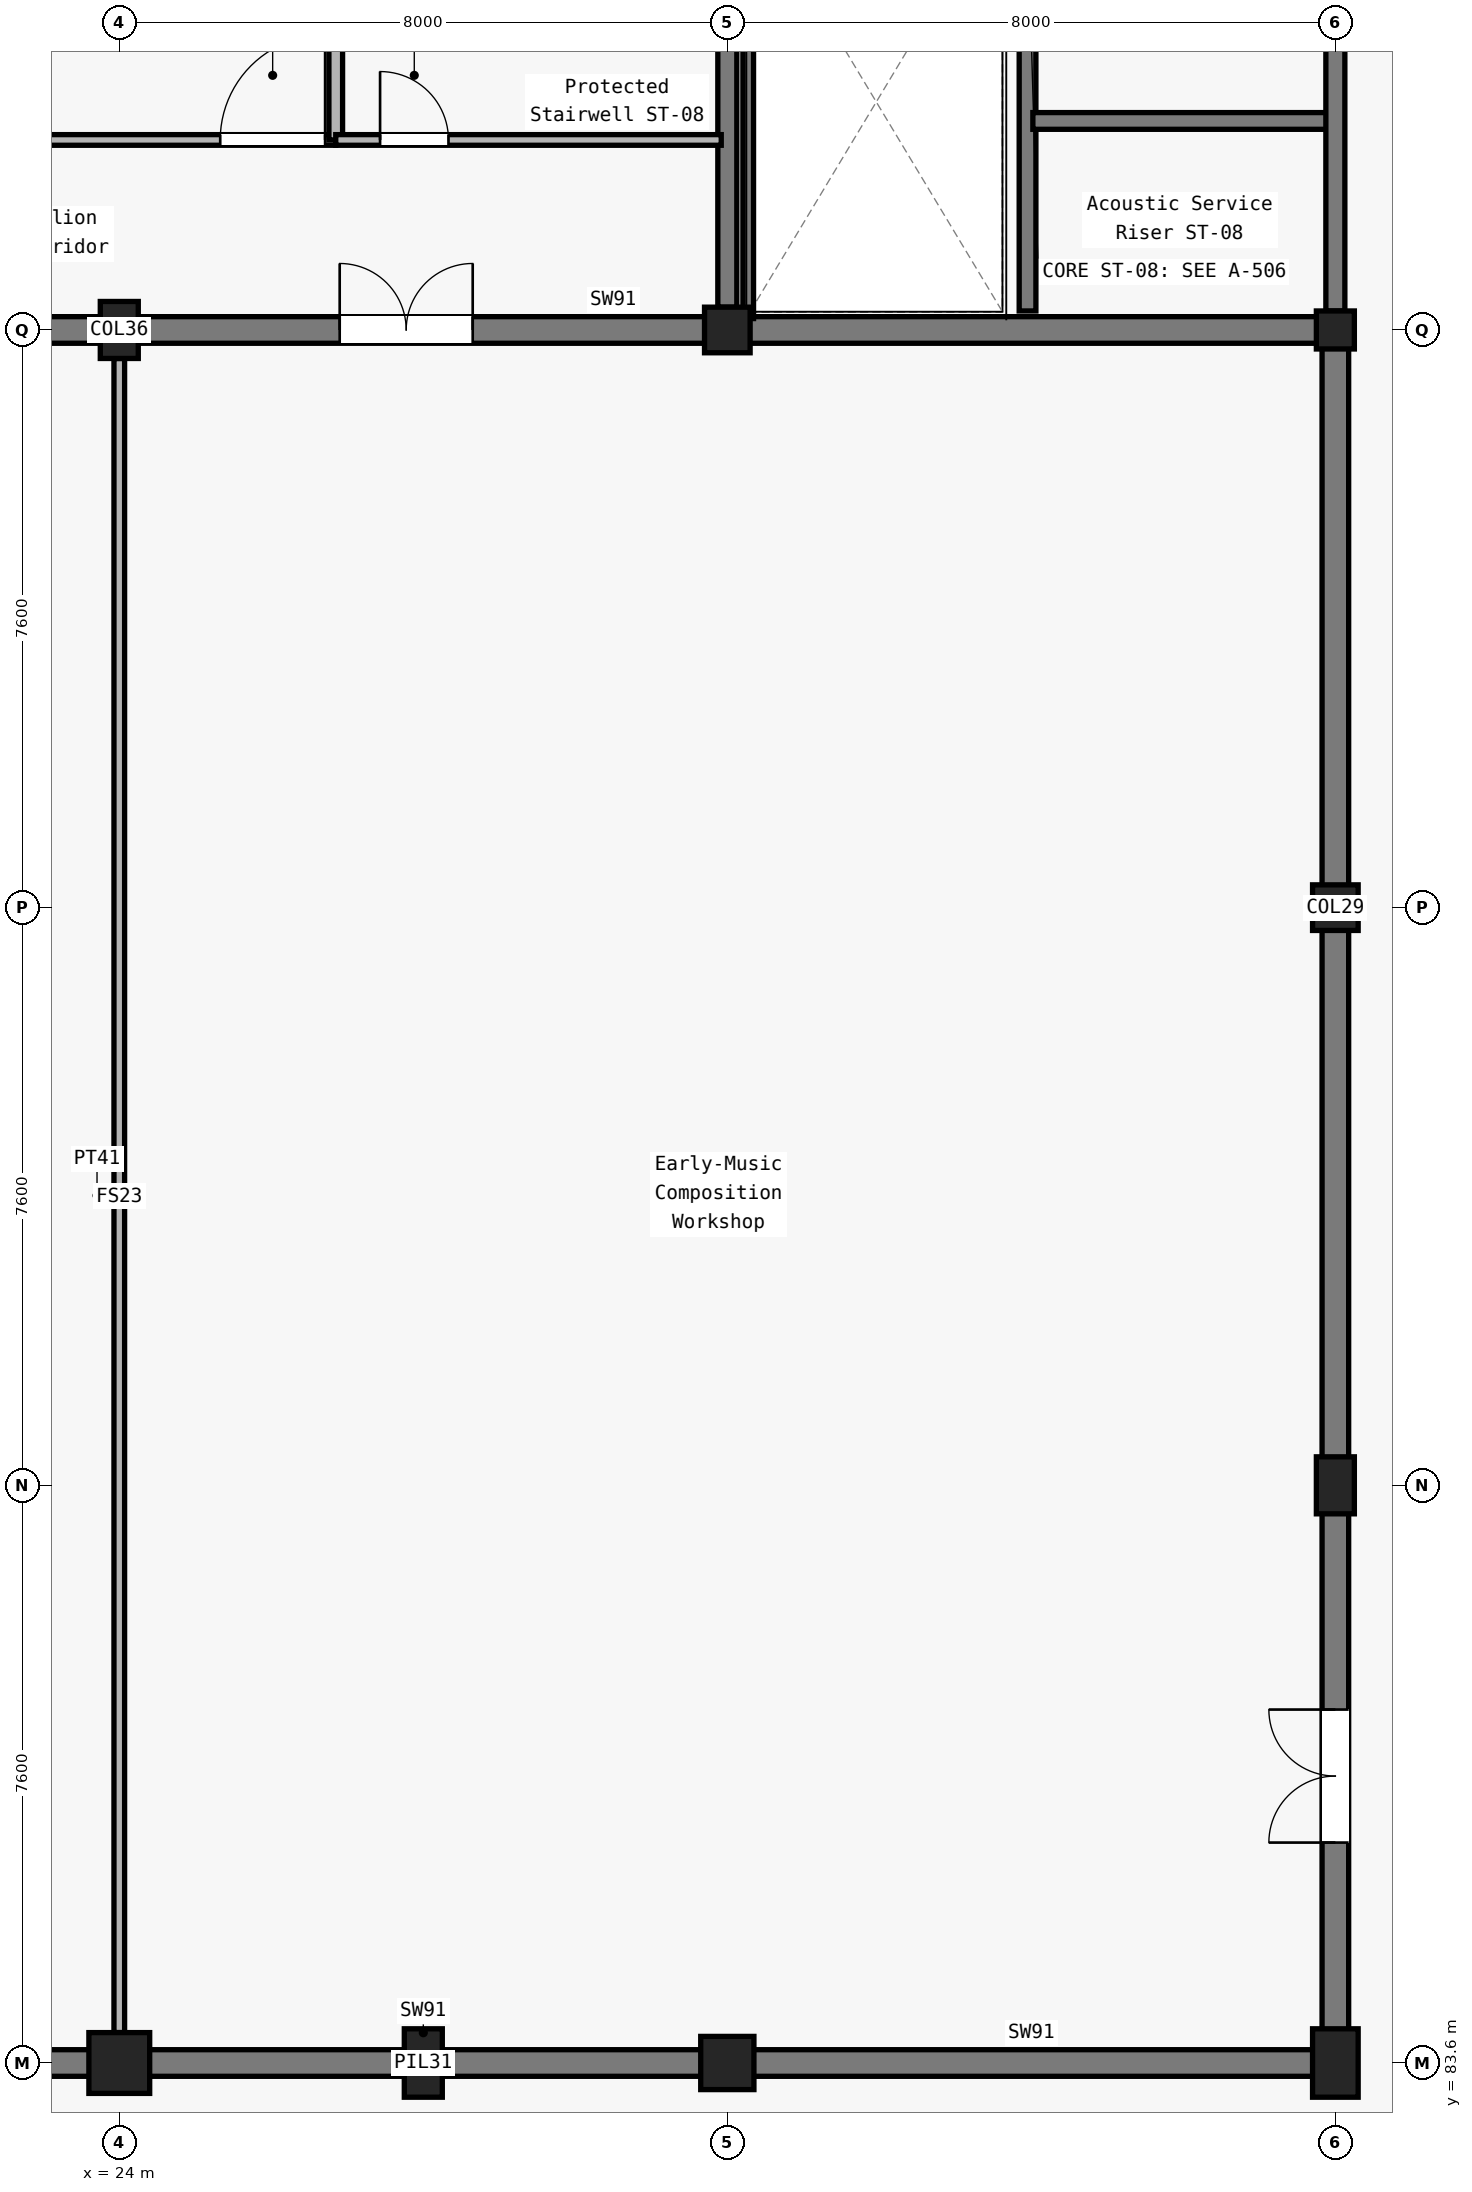
"""IFC4 building model, lengths in metres.
Left out: names, types, materials, properties, quantities, classifications, styles, units other than length and angle.
Written with IfcOpenShell. Run it as: python <this file> out.ifc"""

import sys

from ifc_helpers import new_model, si_unit, direction, frame, frame_2d, origin, origin_2d, place, context, subcontext, project, spatial, rectangle, extrude, element, fill, save


model = new_model("IFC4")
c1 = context("Model", 3, precision=1e-05, world=origin(), true_north=direction((0.0, 1.0)))
c2 = subcontext(c1, "Body", "Model", "MODEL_VIEW")
j1 = project(units=[si_unit("LENGTHUNIT", "METRE"), si_unit("PLANEANGLEUNIT", "RADIAN")], contexts=[c1])
p1 = place(None, origin())
s1 = spatial("IfcSite", under=j1, at=p1, CompositionType="ELEMENT")
p2 = place(p1, origin())
s2 = spatial("IfcBuilding", under=s1, at=p2, CompositionType="ELEMENT")
p3 = place(p2, frame((0.0, 0.0, 10.2)))
s3 = spatial("IfcBuildingStorey", under=s2, at=p3, CompositionType="ELEMENT", Elevation=10.2)
p4 = place(p3, frame((24.0, 83.6, 0.0), z_axis=(0.0, 0.0, 1.0), x_axis=(1.0, 0.0, 0.0)))
e1 = element("IfcColumn", 1, at=p4, inside=s3, PredefinedType="COLUMN", context=c2, shape_type="SweptSolid", body=[
    extrude(rectangle(XDim=0.8, YDim=0.8, at=origin_2d()), origin(), (0.0, 0.0, 1.0), 4.8),
])
p5 = place(p3, frame((24.0, 106.4, 0.0), z_axis=(0.0, 0.0, 1.0), x_axis=(1.0, 0.0, 0.0)))
e2 = element("IfcColumn", 2, at=p5, inside=s3, PredefinedType="COLUMN", context=c2, shape_type="SweptSolid", body=[
    extrude(rectangle(XDim=0.5, YDim=0.75, at=origin_2d()), origin(), (0.0, 0.0, 1.0), 4.8),
])
p6 = place(p3, frame((32.0, 83.6, 0.0), z_axis=(0.0, 0.0, 1.0), x_axis=(1.0, 0.0, 0.0)))
e3 = element("IfcColumn", 3, at=p6, inside=s3, PredefinedType="COLUMN", context=c2, shape_type="SweptSolid", body=[
    extrude(rectangle(XDim=0.7, YDim=0.7, at=origin_2d()), origin(), (0.0, 0.0, 1.0), 4.8),
])
p7 = place(p3, frame((32.0, 106.4, 0.0), z_axis=(0.0, 0.0, 1.0), x_axis=(1.0, 0.0, 0.0)))
e4 = element("IfcColumn", 4, at=p7, inside=s3, PredefinedType="COLUMN", context=c2, shape_type="SweptSolid", body=[
    extrude(rectangle(XDim=0.6, YDim=0.6, at=origin_2d()), origin(), (0.0, 0.0, 1.0), 4.8),
])
p8 = place(p3, frame((40.0, 83.6, 0.0), z_axis=(0.0, 0.0, 1.0), x_axis=(1.0, 0.0, 0.0)))
e5 = element("IfcColumn", 5, at=p8, inside=s3, PredefinedType="COLUMN", context=c2, shape_type="SweptSolid", body=[
    extrude(rectangle(XDim=0.6, YDim=0.9, at=origin_2d()), origin(), (0.0, 0.0, 1.0), 4.8),
])
p9 = place(p3, frame((40.0, 91.2, 0.0), z_axis=(0.0, 0.0, 1.0), x_axis=(1.0, 0.0, 0.0)))
e6 = element("IfcColumn", 6, at=p9, inside=s3, PredefinedType="COLUMN", context=c2, shape_type="SweptSolid", body=[
    extrude(rectangle(XDim=0.5, YDim=0.75, at=origin_2d()), origin(), (0.0, 0.0, 1.0), 4.8),
])
p10 = place(p3, frame((40.0, 98.8, 0.0), z_axis=(0.0, 0.0, 1.0), x_axis=(1.0, 0.0, 0.0)))
e7 = element("IfcColumn", 7, at=p10, inside=s3, PredefinedType="COLUMN", context=c2, shape_type="SweptSolid", body=[
    extrude(rectangle(XDim=0.6, YDim=0.6, at=origin_2d()), origin(), (0.0, 0.0, 1.0), 4.8),
])
p11 = place(p3, frame((40.0, 106.4, 0.0), z_axis=(0.0, 0.0, 1.0), x_axis=(1.0, 0.0, 0.0)))
e8 = element("IfcColumn", 8, at=p11, inside=s3, PredefinedType="COLUMN", context=c2, shape_type="SweptSolid", body=[
    extrude(rectangle(XDim=0.5, YDim=0.5, at=origin_2d()), origin(), (0.0, 0.0, 1.0), 4.8),
])
p12 = place(p3, frame((28.0, 83.6, 0.0), z_axis=(0.0, 0.0, 1.0), x_axis=(1.0, 0.0, 0.0)))
e9 = element("IfcColumn", 9, at=p12, inside=s3, PredefinedType="PILASTER", context=c2, shape_type="SweptSolid", body=[
    extrude(rectangle(XDim=0.5, YDim=0.9, at=origin_2d()), origin(), (0.0, 0.0, 1.0), 4.8),
])
p13 = place(p3, frame((16.0, 83.6, 0.0), z_axis=(0.0, 0.0, 1.0), x_axis=(1.0, 0.0, 0.0)))
e10 = element("IfcWall", 10, at=p13, inside=s3, PredefinedType="SHEAR", context=c2, shape_type="SweptSolid", body=[
    extrude(rectangle(XDim=8.0, YDim=0.35, at=frame_2d((4.0, 0.0))), origin(), (0.0, 0.0, 1.0), 4.52),
])
p14 = place(p13, frame((2.9, 0.0, 0.0)))
e11 = element("IfcOpeningElement", 11, at=p14, cuts=e10, PredefinedType="OPENING", context=c2, shape_type="SweptSolid", body=[
    extrude(rectangle(XDim=1.75, YDim=2.25, at=frame_2d((0.875, 1.125))), frame((0.0, 0.185, 0.0), z_axis=(0.0, -1.0, 0.0), x_axis=(1.0, 0.0, 0.0)), (0.0, 0.0, 1.0), 0.37),
])
for number, where, z_axis, x_axis in (
    (12, (24.0, 83.6, 0.0), (0.0, 0.0, 1.0), (1.0, 0.0, 0.0)),
    (13, (32.0, 83.6, 0.0), (0.0, 0.0, 1.0), (1.0, 0.0, 0.0)),
):
    element("IfcWall", number, at=place(p3, frame(where, z_axis=z_axis, x_axis=x_axis)), inside=s3, PredefinedType="SHEAR", context=c2, shape_type="SweptSolid", body=[
        extrude(rectangle(XDim=8.0, YDim=0.35, at=frame_2d((4.0, 0.0))), origin(), (0.0, 0.0, 1.0), 4.52),
    ])
p15 = place(p3, frame((16.0, 106.4, 0.0), z_axis=(0.0, 0.0, 1.0), x_axis=(1.0, 0.0, 0.0)))
e14 = element("IfcWall", 14, at=p15, inside=s3, PredefinedType="SHEAR", context=c2, shape_type="SweptSolid", body=[
    extrude(rectangle(XDim=8.0, YDim=0.35, at=frame_2d((4.0, 0.0))), origin(), (0.0, 0.0, 1.0), 4.52),
])
p16 = place(p15, frame((2.9, 0.0, 0.0)))
e15 = element("IfcOpeningElement", 15, at=p16, cuts=e14, PredefinedType="OPENING", context=c2, shape_type="SweptSolid", body=[
    extrude(rectangle(XDim=1.75, YDim=2.25, at=frame_2d((0.875, 1.125))), frame((0.0, 0.185, 0.0), z_axis=(0.0, -1.0, 0.0), x_axis=(1.0, 0.0, 0.0)), (0.0, 0.0, 1.0), 0.37),
])
p17 = place(p3, frame((24.0, 106.4, 0.0), z_axis=(0.0, 0.0, 1.0), x_axis=(1.0, 0.0, 0.0)))
e16 = element("IfcWall", 16, at=p17, inside=s3, PredefinedType="SHEAR", context=c2, shape_type="SweptSolid", body=[
    extrude(rectangle(XDim=8.0, YDim=0.35, at=frame_2d((4.0, 0.0))), origin(), (0.0, 0.0, 1.0), 4.52),
])
p18 = place(p17, frame((2.9, 0.0, 0.0)))
e17 = element("IfcOpeningElement", 17, at=p18, cuts=e16, PredefinedType="OPENING", context=c2, shape_type="SweptSolid", body=[
    extrude(rectangle(XDim=1.75, YDim=2.25, at=frame_2d((0.875, 1.125))), frame((0.0, 0.185, 0.0), z_axis=(0.0, -1.0, 0.0), x_axis=(1.0, 0.0, 0.0)), (0.0, 0.0, 1.0), 0.37),
])
p19 = place(p3, frame((32.0, 106.4, 0.0), z_axis=(0.0, 0.0, 1.0), x_axis=(1.0, 0.0, 0.0)))
e18 = element("IfcWall", 18, at=p19, inside=s3, PredefinedType="SHEAR", context=c2, shape_type="SweptSolid", body=[
    extrude(rectangle(XDim=8.0, YDim=0.35, at=frame_2d((4.0, 0.0))), origin(), (0.0, 0.0, 1.0), 4.52),
])
p20 = place(p3, frame((40.0, 83.6, 0.0), z_axis=(0.0, 0.0, 1.0), x_axis=(0.0, 1.0, 0.0)))
e19 = element("IfcWall", 19, at=p20, inside=s3, PredefinedType="SHEAR", context=c2, shape_type="SweptSolid", body=[
    extrude(rectangle(XDim=7.6, YDim=0.35, at=frame_2d((3.8, 0.0))), origin(), (0.0, 0.0, 1.0), 4.52),
])
p21 = place(p20, frame((2.9, 0.0, 0.0)))
e20 = element("IfcOpeningElement", 20, at=p21, cuts=e19, PredefinedType="OPENING", context=c2, shape_type="SweptSolid", body=[
    extrude(rectangle(XDim=1.75, YDim=2.25, at=frame_2d((0.875, 1.125))), frame((0.0, 0.185, 0.0), z_axis=(0.0, -1.0, 0.0), x_axis=(1.0, 0.0, 0.0)), (0.0, 0.0, 1.0), 0.37),
])
p22 = place(p3, frame((40.0, 91.2, 0.0), z_axis=(0.0, 0.0, 1.0), x_axis=(0.0, 1.0, 0.0)))
e21 = element("IfcWall", 21, at=p22, inside=s3, PredefinedType="SHEAR", context=c2, shape_type="SweptSolid", body=[
    extrude(rectangle(XDim=7.6, YDim=0.35, at=frame_2d((3.8, 0.0))), origin(), (0.0, 0.0, 1.0), 4.52),
])
p23 = place(p3, frame((40.0, 98.8, 0.0), z_axis=(0.0, 0.0, 1.0), x_axis=(0.0, 1.0, 0.0)))
e22 = element("IfcWall", 22, at=p23, inside=s3, PredefinedType="SHEAR", context=c2, shape_type="SweptSolid", body=[
    extrude(rectangle(XDim=7.6, YDim=0.35, at=frame_2d((3.8, 0.0))), origin(), (0.0, 0.0, 1.0), 4.52),
])
p24 = place(p3, frame((32.0, 106.7, 0.0), z_axis=(0.0, 0.0, 1.0), x_axis=(0.0, 1.0, 0.0)))
e23 = element("IfcWall", 23, at=p24, inside=s3, PredefinedType="SOLIDWALL", context=c2, shape_type="SweptSolid", body=[
    extrude(rectangle(XDim=7.05, YDim=0.25, at=frame_2d((3.525, 0.0))), origin(), (0.0, 0.0, 1.0), 3.865),
])
p25 = place(p3, frame((35.95, 106.65, 0.0), z_axis=(0.0, 0.0, 1.0), x_axis=(0.0, 1.0, 0.0)))
e24 = element("IfcWall", 24, at=p25, inside=s3, PredefinedType="SOLIDWALL", context=c2, shape_type="SweptSolid", body=[
    extrude(rectangle(XDim=7.1, YDim=0.22, at=frame_2d((3.55, 0.0))), origin(), (0.0, 0.0, 1.0), 4.52),
])
p26 = place(p25, frame((5.55, 0.0, 0.0)))
e25 = element("IfcOpeningElement", 25, at=p26, cuts=e24, PredefinedType="OPENING", context=c2, shape_type="SweptSolid", body=[
    extrude(rectangle(XDim=1.2, YDim=2.15, at=frame_2d((0.6, 1.075))), frame((0.0, 0.12, 0.0), z_axis=(0.0, -1.0, 0.0), x_axis=(1.0, 0.0, 0.0)), (0.0, 0.0, 1.0), 0.24),
])
p27 = place(p3, frame((36.02, 109.15, 0.0), z_axis=(0.0, 0.0, 1.0), x_axis=(1.0, 0.0, 0.0)))
e26 = element("IfcWall", 26, at=p27, inside=s3, PredefinedType="SOLIDWALL", context=c2, shape_type="SweptSolid", body=[
    extrude(rectangle(XDim=3.93, YDim=0.22, at=frame_2d((1.965, 0.0))), origin(), (0.0, 0.0, 1.0), 3.865),
])
p28 = place(p3, frame((40.0, 106.65, 0.0), z_axis=(0.0, 0.0, 1.0), x_axis=(0.0, 1.0, 0.0)))
e27 = element("IfcWall", 27, at=p28, inside=s3, PredefinedType="SOLIDWALL", context=c2, shape_type="SweptSolid", body=[
    extrude(rectangle(XDim=6.95, YDim=0.25, at=frame_2d((3.475, 0.0))), origin(), (0.0, 0.0, 1.0), 3.865),
])
p29 = place(p28, frame((3.6, 0.0, 0.0)))
e28 = element("IfcOpeningElement", 28, at=p29, cuts=e27, PredefinedType="OPENING", context=c2, shape_type="SweptSolid", body=[
    extrude(rectangle(XDim=1.35, YDim=2.2, at=frame_2d((0.675, 1.1))), frame((0.0, 0.135, 0.0), z_axis=(0.0, -1.0, 0.0), x_axis=(1.0, 0.0, 0.0)), (0.0, 0.0, 1.0), 0.27),
])
p30 = place(p3, frame((21.268, 108.9, 0.0), z_axis=(0.0, 0.0, 1.0), x_axis=(1.0, 0.0, 0.0)))
e29 = element("IfcWall", 29, at=p30, inside=s3, PredefinedType="PARTITIONING", context=c2, shape_type="SweptSolid", body=[
    extrude(rectangle(XDim=5.58, YDim=0.14, at=frame_2d((2.79, 0.0))), origin(), (0.0, 0.0, 1.0), 3.865),
])
p31 = place(p30, frame((4.06, 0.0, 0.0)))
e30 = element("IfcOpeningElement", 30, at=p31, cuts=e29, PredefinedType="OPENING", context=c2, shape_type="SweptSolid", body=[
    extrude(rectangle(XDim=1.38, YDim=2.2, at=frame_2d((0.69, 1.1))), frame((0.0, 0.08, 0.0), z_axis=(0.0, -1.0, 0.0), x_axis=(1.0, 0.0, 0.0)), (0.0, 0.0, 1.0), 0.16),
])
p32 = place(p3, frame((26.848, 108.9, 0.0), z_axis=(0.0, 0.0, 1.0), x_axis=(0.0, 1.0, 0.0)))
e31 = element("IfcWall", 31, at=p32, inside=s3, PredefinedType="PARTITIONING", context=c2, shape_type="SweptSolid", body=[
    extrude(rectangle(XDim=5.02, YDim=0.18, at=frame_2d((2.51, 0.0))), origin(), (0.0, 0.0, 1.0), 3.865),
])
p33 = place(p3, frame((26.848, 108.9, 0.0), z_axis=(0.0, 0.0, 1.0), x_axis=(1.0, 0.0, 0.0)))
e32 = element("IfcWall", 32, at=p33, inside=s3, PredefinedType="PARTITIONING", context=c2, shape_type="SweptSolid", body=[
    extrude(rectangle(XDim=5.072, YDim=0.14, at=frame_2d((2.536, 0.0))), origin(), (0.0, 0.0, 1.0), 3.865),
])
p34 = place(p33, frame((0.583, 0.0, 0.0)))
e33 = element("IfcOpeningElement", 33, at=p34, cuts=e32, PredefinedType="OPENING", context=c2, shape_type="SweptSolid", body=[
    extrude(rectangle(XDim=0.9, YDim=2.05, at=frame_2d((0.45, 1.025))), frame((0.0, 0.08, 0.0), z_axis=(0.0, -1.0, 0.0), x_axis=(1.0, 0.0, 0.0)), (0.0, 0.0, 1.0), 0.16),
])
p35 = place(p3, frame((24.0, 84.0, 0.0), z_axis=(0.0, 0.0, 1.0), x_axis=(0.0, 1.0, 0.0)))
e34 = element("IfcWall", 34, at=p35, inside=s3, PredefinedType="PARTITIONING", context=c2, shape_type="SweptSolid", body=[
    extrude(rectangle(XDim=22.025, YDim=0.14, at=frame_2d((11.012, 0.0))), origin(), (0.0, 0.0, 1.0), 3.865),
])
p36 = place(p3, frame((32.275, 106.55, 0.0), z_axis=(0.0, 0.0, 1.0), x_axis=(0.0, 1.0, 0.0)))
e35 = element("IfcWall", 35, at=p36, inside=s3, PredefinedType="SOLIDWALL", context=c2, shape_type="SweptSolid", body=[
    extrude(rectangle(XDim=7.3, YDim=0.14, at=frame_2d((3.65, 0.0))), origin(), (0.0, 0.0, 1.0), 4.52),
])
p37 = place(p31, origin())
e36 = element("IfcDoor", 36, at=p37, inside=s3, OperationType="SINGLE_SWING_RIGHT", PredefinedType="DOOR", context=c2, shape_type="SweptSolid", body=[
    extrude(rectangle(XDim=1.38, YDim=2.2, at=frame_2d((0.69, 1.1))), frame((0.0, 0.025, 0.0), z_axis=(0.0, -1.0, 0.0), x_axis=(1.0, 0.0, 0.0)), (0.0, 0.0, 1.0), 0.05),
])
fill(e30, e36)
p38 = place(p34, origin())
e37 = element("IfcDoor", 37, at=p38, inside=s3, OperationType="SINGLE_SWING_LEFT", PredefinedType="DOOR", context=c2, shape_type="SweptSolid", body=[
    extrude(rectangle(XDim=0.9, YDim=2.05, at=frame_2d((0.45, 1.025))), frame((0.0, 0.025, 0.0), z_axis=(0.0, -1.0, 0.0), x_axis=(1.0, 0.0, 0.0)), (0.0, 0.0, 1.0), 0.05),
])
fill(e33, e37)
p39 = place(p18, origin())
e38 = element("IfcDoor", 38, at=p39, inside=s3, OperationType="DOUBLE_DOOR_SINGLE_SWING", PredefinedType="DOOR", context=c2, shape_type="SweptSolid", body=[
    extrude(rectangle(XDim=1.75, YDim=2.25, at=frame_2d((0.875, 1.125))), frame((0.0, 0.025, 0.0), z_axis=(0.0, -1.0, 0.0), x_axis=(1.0, 0.0, 0.0)), (0.0, 0.0, 1.0), 0.05),
])
fill(e17, e38)
p40 = place(p21, origin())
e39 = element("IfcDoor", 39, at=p40, inside=s3, OperationType="DOUBLE_DOOR_SINGLE_SWING", PredefinedType="DOOR", context=c2, shape_type="SweptSolid", body=[
    extrude(rectangle(XDim=1.75, YDim=2.25, at=frame_2d((0.875, 1.125))), frame((0.0, 0.025, 0.0), z_axis=(0.0, -1.0, 0.0), x_axis=(1.0, 0.0, 0.0)), (0.0, 0.0, 1.0), 0.05),
])
fill(e20, e39)
save(model, sys.argv[1])
